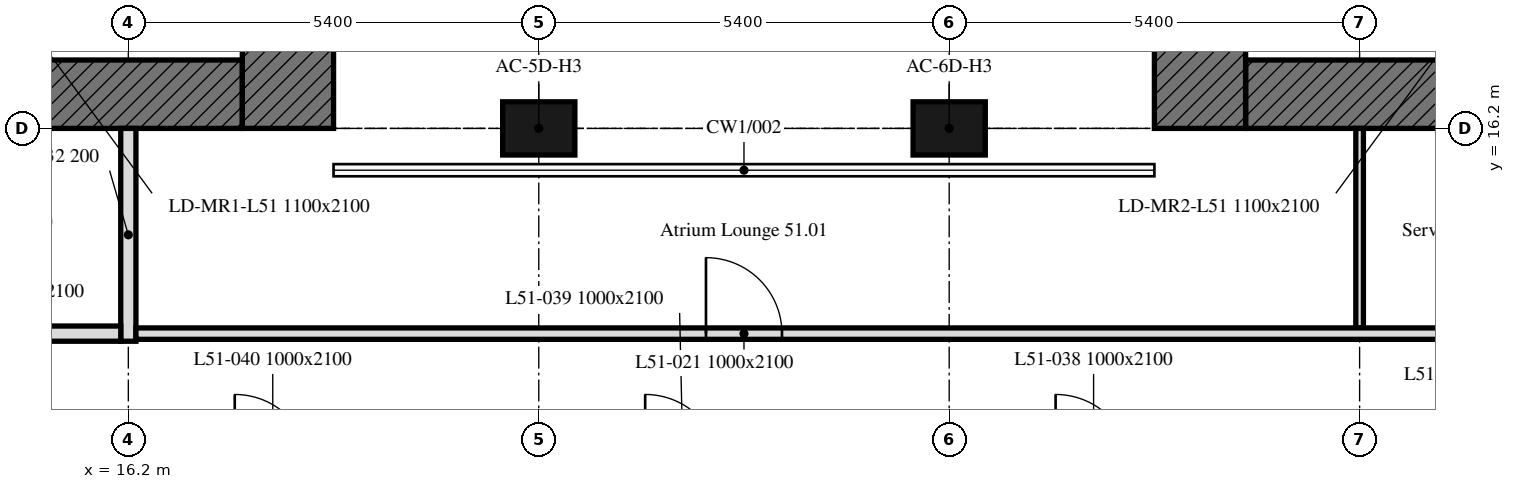
"""IFC4 building model, lengths in metres.
Left out: names, types, materials, properties, quantities, classifications, styles, units other than length and angle.
Written with IfcOpenShell. Run it as: python <this file> out.ifc"""

import sys

from ifc_helpers import new_model, si_unit, direction, frame, frame_2d, origin, origin_2d, place, context, subcontext, project, spatial, rectangle, extrude, element, fill, save


model = new_model("IFC4")
c1 = context("Model", 3, precision=1e-05, world=origin(), true_north=direction((0.0, 1.0)))
c2 = subcontext(c1, "Body", "Model", "MODEL_VIEW")
j1 = project(units=[si_unit("LENGTHUNIT", "METRE"), si_unit("PLANEANGLEUNIT", "RADIAN")], contexts=[c1])
p1 = place(None, origin())
s1 = spatial("IfcSite", under=j1, at=p1, CompositionType="ELEMENT")
p2 = place(p1, origin())
s2 = spatial("IfcBuilding", under=s1, at=p2, CompositionType="ELEMENT")
p3 = place(p2, frame((0.0, 0.0, 207.1)))
s3 = spatial("IfcBuildingStorey", under=s2, at=p3, CompositionType="ELEMENT", Elevation=207.1)
for number, where, z_axis, x_axis in (
    (1, (21.6, 16.2, 0.0), (0.0, 0.0, 1.0), (1.0, 0.0, 0.0)),
    (2, (27.0, 16.2, 0.0), (0.0, 0.0, 1.0), (1.0, 0.0, 0.0)),
):
    element("IfcColumn", number, at=place(p3, frame(where, z_axis=z_axis, x_axis=x_axis)), inside=s3, PredefinedType="COLUMN", context=c2, shape_type="SweptSolid", body=[
        extrude(rectangle(XDim=0.95, YDim=0.7, at=origin_2d()), origin(), (0.0, 0.0, 1.0), 3.0),
    ])
p4 = place(p3, frame((17.7, 16.65, 0.0), z_axis=(0.0, 0.0, 1.0), x_axis=(-1.0, 0.0, 0.0)))
e3 = element("IfcWall", 3, at=p4, inside=s3, PredefinedType="SOLIDWALL", context=c2, shape_type="SweptSolid", body=[
    extrude(rectangle(XDim=11.1, YDim=0.9, at=frame_2d((5.55, 0.0))), origin(), (0.0, 0.0, 1.0), 3.0),
])
p5 = place(p4, frame((5.55, 0.0, 0.0)))
e4 = element("IfcOpeningElement", 4, at=p5, cuts=e3, PredefinedType="OPENING", context=c2, shape_type="SweptSolid", body=[
    extrude(rectangle(XDim=2.0, YDim=2.4, at=frame_2d((1.0, 1.2))), frame((0.0, 0.45, 0.0), z_axis=(0.0, -1.0, 0.0), x_axis=(1.0, 0.0, 0.0)), (0.0, 0.0, 1.0), 0.9),
])
p6 = place(p3, frame((18.3, 32.4, 0.0), z_axis=(0.0, 0.0, 1.0), x_axis=(0.0, -1.0, 0.0)))
e5 = element("IfcWall", 5, at=p6, inside=s3, PredefinedType="SOLIDWALL", context=c2, shape_type="SweptSolid", body=[
    extrude(rectangle(XDim=16.2, YDim=1.2, at=frame_2d((8.1, 0.0))), origin(), (0.0, 0.0, 1.0), 3.0),
])
p7 = place(p3, frame((42.0, 16.65, 0.0), z_axis=(0.0, 0.0, 1.0), x_axis=(-1.0, 0.0, 0.0)))
e6 = element("IfcWall", 6, at=p7, inside=s3, PredefinedType="SOLIDWALL", context=c2, shape_type="SweptSolid", body=[
    extrude(rectangle(XDim=11.1, YDim=0.9, at=frame_2d((5.55, 0.0))), origin(), (0.0, 0.0, 1.0), 3.0),
])
p8 = place(p7, frame((3.55, 0.0, 0.0)))
e7 = element("IfcOpeningElement", 7, at=p8, cuts=e6, PredefinedType="OPENING", context=c2, shape_type="SweptSolid", body=[
    extrude(rectangle(XDim=2.0, YDim=2.4, at=frame_2d((1.0, 1.2))), frame((0.0, 0.45, 0.0), z_axis=(0.0, -1.0, 0.0), x_axis=(1.0, 0.0, 0.0)), (0.0, 0.0, 1.0), 0.9),
])
p9 = place(p3, frame((30.3, 16.2, 0.0), z_axis=(0.0, 0.0, 1.0), x_axis=(0.0, 1.0, 0.0)))
e8 = element("IfcWall", 8, at=p9, inside=s3, PredefinedType="SOLIDWALL", context=c2, shape_type="SweptSolid", body=[
    extrude(rectangle(XDim=16.2, YDim=1.2, at=frame_2d((8.1, 0.0))), origin(), (0.0, 0.0, 1.0), 3.0),
])
p10 = place(p3, frame((16.2, 16.2, 0.0), z_axis=(0.0, 0.0, 1.0), x_axis=(0.0, -1.0, 0.0)))
e9 = element("IfcWall", 9, at=p10, inside=s3, PredefinedType="PARTITIONING", context=c2, shape_type="SweptSolid", body=[
    extrude(rectangle(XDim=2.8, YDim=0.2, at=frame_2d((1.4, 0.0))), origin(), (0.0, 0.0, 1.0), 3.0),
])
p11 = place(p3, frame((32.4, 13.575, 0.0), z_axis=(0.0, 0.0, 1.0), x_axis=(0.0, 1.0, 0.0)))
e10 = element("IfcWall", 10, at=p11, inside=s3, PredefinedType="PARTITIONING", context=c2, shape_type="SweptSolid", body=[
    extrude(rectangle(XDim=2.625, YDim=0.1, at=frame_2d((1.312, 0.0))), origin(), (0.0, 0.0, 1.0), 3.0),
])
p12 = place(p3, frame((16.3, 13.5, 0.0), z_axis=(0.0, 0.0, 1.0), x_axis=(1.0, 0.0, 0.0)))
e11 = element("IfcWall", 11, at=p12, inside=s3, PredefinedType="PARTITIONING", context=c2, shape_type="SweptSolid", body=[
    extrude(rectangle(XDim=26.149, YDim=0.15, at=frame_2d((13.074, 0.0))), origin(), (0.0, 0.0, 1.0), 3.0),
])
p13 = place(p12, frame((7.5, 0.0, 0.0)))
e12 = element("IfcOpeningElement", 12, at=p13, cuts=e11, PredefinedType="OPENING", context=c2, shape_type="SweptSolid", body=[
    extrude(rectangle(XDim=1.0, YDim=2.1, at=frame_2d((0.5, 1.05))), frame((0.0, 0.075, 0.0), z_axis=(0.0, -1.0, 0.0), x_axis=(1.0, 0.0, 0.0)), (0.0, 0.0, 1.0), 0.15),
])
p14 = place(p12, frame((23.12, 0.0, 0.0)))
e13 = element("IfcOpeningElement", 13, at=p14, cuts=e11, PredefinedType="OPENING", context=c2, shape_type="SweptSolid", body=[
    extrude(rectangle(XDim=1.0, YDim=2.1, at=frame_2d((0.5, 1.05))), frame((0.0, 0.075, 0.0), z_axis=(0.0, -1.0, 0.0), x_axis=(1.0, 0.0, 0.0)), (0.0, 0.0, 1.0), 0.15),
])
p15 = place(p12, frame((17.225, 0.0, 0.0)))
e14 = element("IfcOpeningElement", 14, at=p15, cuts=e11, PredefinedType="OPENING", context=c2, shape_type="SweptSolid", body=[
    extrude(rectangle(XDim=1.0, YDim=2.1, at=frame_2d((0.5, 1.05))), frame((0.0, 0.075, 0.0), z_axis=(0.0, -1.0, 0.0), x_axis=(1.0, 0.0, 0.0)), (0.0, 0.0, 1.0), 0.15),
])
p16 = place(p12, frame((19.65, 0.0, 0.0)))
e15 = element("IfcOpeningElement", 15, at=p16, cuts=e11, PredefinedType="OPENING", context=c2, shape_type="SweptSolid", body=[
    extrude(rectangle(XDim=1.8, YDim=2.4, at=frame_2d((0.9, 1.2))), frame((0.0, 0.075, 0.0), z_axis=(0.0, -1.0, 0.0), x_axis=(1.0, 0.0, 0.0)), (0.0, 0.0, 1.0), 0.15),
])
p17 = place(p3, frame((16.1, 13.5, 0.0), z_axis=(0.0, 0.0, 1.0), x_axis=(-1.0, 0.0, 0.0)))
e16 = element("IfcWall", 16, at=p17, inside=s3, PredefinedType="PARTITIONING", context=c2, shape_type="SweptSolid", body=[
    extrude(rectangle(XDim=3.05, YDim=0.2, at=frame_2d((1.525, 0.0))), origin(), (0.0, 0.0, 1.0), 3.0),
])
p18 = place(p17, frame((1.025, 0.0, 0.0)))
e17 = element("IfcOpeningElement", 17, at=p18, cuts=e16, PredefinedType="OPENING", context=c2, shape_type="SweptSolid", body=[
    extrude(rectangle(XDim=1.0, YDim=2.1, at=frame_2d((0.5, 1.05))), frame((0.0, 0.1, 0.0), z_axis=(0.0, -1.0, 0.0), x_axis=(1.0, 0.0, 0.0)), (0.0, 0.0, 1.0), 0.2),
])
p19 = place(p13, origin())
e18 = element("IfcDoor", 18, at=p19, inside=s3, OperationType="SINGLE_SWING_LEFT", PredefinedType="DOOR", context=c2, shape_type="SweptSolid", body=[
    extrude(rectangle(XDim=1.0, YDim=2.1, at=frame_2d((0.5, 1.05))), frame((0.0, 0.025, 0.0), z_axis=(0.0, -1.0, 0.0), x_axis=(1.0, 0.0, 0.0)), (0.0, 0.0, 1.0), 0.05),
])
fill(e12, e18)
save(model, sys.argv[1])
